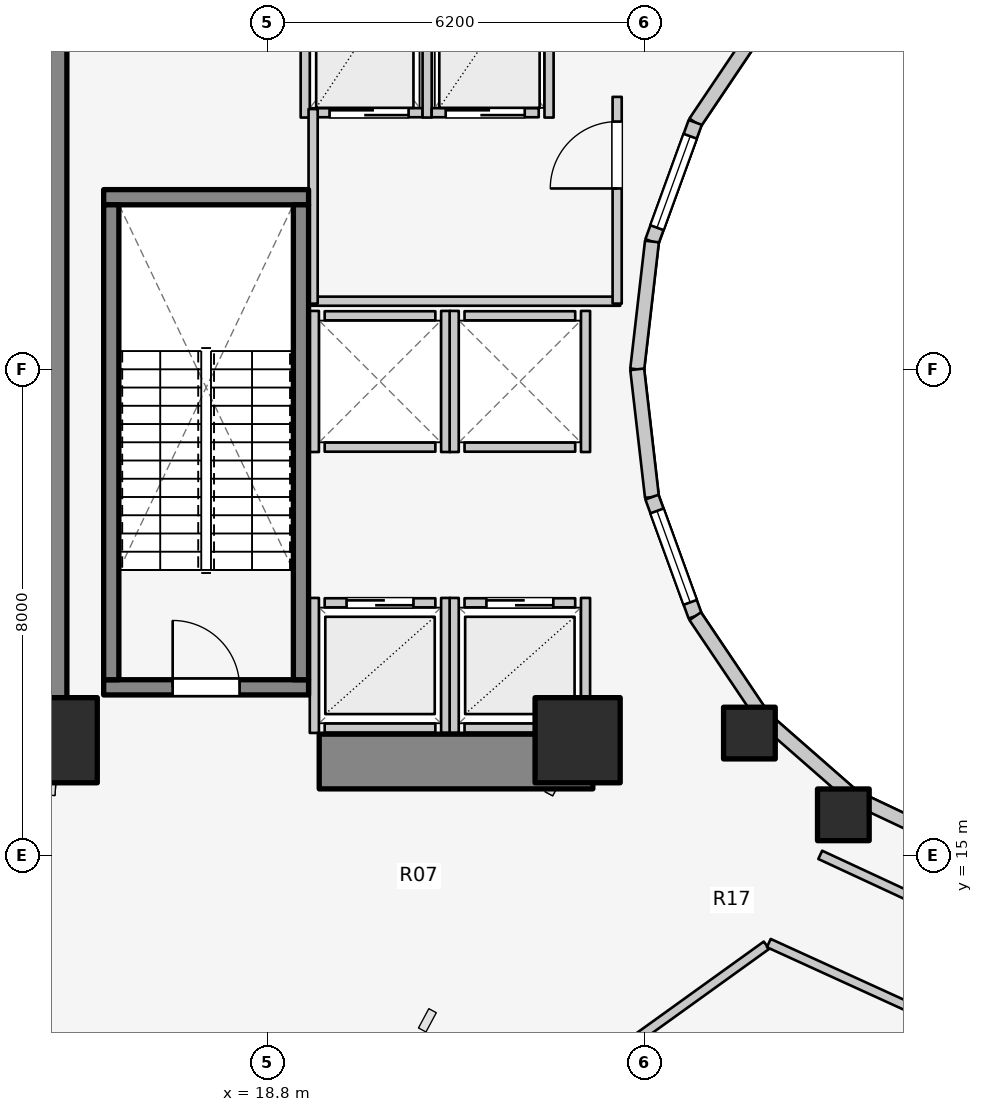
"""IFC4 building model, lengths in metres.
Left out: names, types, materials, properties, quantities, classifications, styles, units other than length and angle.
Written with IfcOpenShell. Run it as: python <this file> out.ifc"""

import sys

from ifc_helpers import new_model, si_unit, direction, frame, frame_2d, origin, origin_2d, place, context, subcontext, project, spatial, rectangle, extrude, element, fill, save


model = new_model("IFC4")
c1 = context("Model", 3, precision=1e-05, world=origin(), true_north=direction((0.0, 1.0)))
c2 = subcontext(c1, "Body", "Model", "MODEL_VIEW")
j1 = project(units=[si_unit("LENGTHUNIT", "METRE"), si_unit("PLANEANGLEUNIT", "RADIAN")], contexts=[c1])
p1 = place(None, origin())
s1 = spatial("IfcSite", under=j1, at=p1, CompositionType="ELEMENT")
p2 = place(p1, origin())
s2 = spatial("IfcBuilding", under=s1, at=p2, CompositionType="ELEMENT")
p3 = place(p2, frame((0.0, 0.0, 64.8)))
s3 = spatial("IfcBuildingStorey", under=s2, at=p3, CompositionType="ELEMENT", Elevation=64.8)
p4 = place(p3, frame((15.05, 17.05, 0.0), z_axis=(0.0, 0.0, 1.0), x_axis=(0.0, 1.0, 0.0)))
e1 = element("IfcWall", 1, at=p4, inside=s3, PredefinedType="SHEAR", context=c2, shape_type="SweptSolid", body=[
    extrude(rectangle(XDim=12.8, YDim=0.9, at=frame_2d((6.4, 0.0))), origin(), (0.0, 0.0, 1.0), 4.2),
])
p5 = place(p3, frame((19.65, 16.55, 0.0), z_axis=(0.0, 0.0, 1.0), x_axis=(1.0, 0.0, 0.0)))
e2 = element("IfcWall", 2, at=p5, inside=s3, PredefinedType="SHEAR", context=c2, shape_type="SweptSolid", body=[
    extrude(rectangle(XDim=4.5, YDim=0.9, at=frame_2d((2.25, 0.0))), origin(), (0.0, 0.0, 1.0), 4.2),
])
p6 = place(p3, frame((16.105, 17.77, 0.0), z_axis=(0.0, 0.0, 1.0), x_axis=(1.0, 0.0, 0.0)))
e3 = element("IfcWall", 3, at=p6, inside=s3, PredefinedType="SOLIDWALL", context=c2, shape_type="SweptSolid", body=[
    extrude(rectangle(XDim=3.37, YDim=0.25, at=frame_2d((1.685, 0.0))), origin(), (0.0, 0.0, 1.0), 4.2),
])
p7 = place(p6, frame((1.135, 0.0, 0.0)))
e4 = element("IfcOpeningElement", 4, at=p7, cuts=e3, PredefinedType="OPENING", context=c2, shape_type="SweptSolid", body=[
    extrude(rectangle(XDim=1.1, YDim=2.1, at=frame_2d((0.55, 1.05))), frame((0.0, 0.135, 0.0), z_axis=(0.0, -1.0, 0.0), x_axis=(1.0, 0.0, 0.0)), (0.0, 0.0, 1.0), 0.27),
])
p8 = place(p3, frame((16.105, 25.83, 0.0), z_axis=(0.0, 0.0, 1.0), x_axis=(1.0, 0.0, 0.0)))
e5 = element("IfcWall", 5, at=p8, inside=s3, PredefinedType="SOLIDWALL", context=c2, shape_type="SweptSolid", body=[
    extrude(rectangle(XDim=3.37, YDim=0.25, at=frame_2d((1.685, 0.0))), origin(), (0.0, 0.0, 1.0), 4.2),
])
for number, where, z_axis, x_axis in (
    (6, (16.23, 17.895, 0.0), (0.0, 0.0, 1.0), (0.0, 1.0, 0.0)),
    (7, (19.35, 17.895, 0.0), (0.0, 0.0, 1.0), (0.0, 1.0, 0.0)),
):
    element("IfcWall", number, at=place(p3, frame(where, z_axis=z_axis, x_axis=x_axis)), inside=s3, PredefinedType="SOLIDWALL", context=c2, shape_type="SweptSolid", body=[
        extrude(rectangle(XDim=7.81, YDim=0.25, at=frame_2d((3.905, 0.0))), origin(), (0.0, 0.0, 1.0), 4.2),
    ])
for number, where, z_axis, x_axis in (
    (8, (15.3, 16.9, 0.0), (0.0, 0.0, 1.0), (1.0, 0.0, 0.0)),
    (9, (23.9, 16.9, 0.0), (0.0, 0.0, 1.0), (1.0, 0.0, 0.0)),
):
    element("IfcColumn", number, at=place(p3, frame(where, z_axis=z_axis, x_axis=x_axis)), inside=s3, PredefinedType="COLUMN", context=c2, shape_type="SweptSolid", body=[
        extrude(rectangle(XDim=1.4, YDim=1.4, at=origin_2d()), origin(), (0.0, 0.0, 1.0), 4.2),
    ])
for number, where, z_axis, x_axis in (
    (10, (26.725, 17.018, 0.0), (0.0, 0.0, 1.0), (1.0, 0.0, 0.0)),
    (11, (28.27, 15.673, 0.0), (0.0, 0.0, 1.0), (1.0, 0.0, 0.0)),
):
    element("IfcColumn", number, at=place(p3, frame(where, z_axis=z_axis, x_axis=x_axis)), inside=s3, PredefinedType="COLUMN", context=c2, shape_type="SweptSolid", body=[
        extrude(rectangle(XDim=0.85, YDim=0.85, at=origin_2d()), origin(), (0.0, 0.0, 1.0), 4.2),
    ])
p9 = place(p3, frame((26.965, 28.742, 0.0), z_axis=(0.0, 0.0, 1.0), x_axis=(-0.558197800898, -0.829707909492, 0.0)))
e12 = element("IfcWall", 12, at=p9, inside=s3, PredefinedType="STANDARD", context=c2, shape_type="SweptSolid", body=[
    extrude(rectangle(XDim=2.027, YDim=0.23, at=frame_2d((1.013, 0.0))), origin(), (0.0, 0.0, 1.0), 2.32),
])
p10 = place(p3, frame((25.834, 27.06, 0.0), z_axis=(0.0, 0.0, 1.0), x_axis=(-0.341423187295, -0.93990968033, 0.0)))
e13 = element("IfcWall", 13, at=p10, inside=s3, PredefinedType="STANDARD", context=c2, shape_type="SweptSolid", body=[
    extrude(rectangle(XDim=2.084, YDim=0.23, at=frame_2d((1.042, 0.0))), origin(), (0.0, 0.0, 1.0), 2.8),
])
p11 = place(p10, frame((0.242, 0.0, 0.85)))
e14 = element("IfcOpeningElement", 14, at=p11, cuts=e13, PredefinedType="OPENING", context=c2, shape_type="SweptSolid", body=[
    extrude(rectangle(XDim=1.6, YDim=1.65, at=frame_2d((0.8, 0.825))), frame((0.0, 0.125, 0.0), z_axis=(0.0, -1.0, 0.0), x_axis=(1.0, 0.0, 0.0)), (0.0, 0.0, 1.0), 0.25),
])
for number, where, z_axis, x_axis in (
    (15, (25.123, 25.102, 0.0), (0.0, 0.0, 1.0), (-0.115, -0.993, 0.0)),
    (16, (24.88, 23.0, 0.0), (0.0, 0.0, 1.0), (0.115, -0.993, 0.0)),
):
    element("IfcWall", number, at=place(p3, frame(where, z_axis=z_axis, x_axis=x_axis)), inside=s3, PredefinedType="STANDARD", context=c2, shape_type="SweptSolid", body=[
        extrude(rectangle(XDim=2.115, YDim=0.23, at=frame_2d((1.058, 0.0))), origin(), (0.0, 0.0, 1.0), 2.8),
    ])
p12 = place(p3, frame((25.123, 20.898, 0.0), z_axis=(0.0, 0.0, 1.0), x_axis=(0.341423187295, -0.93990968033, 0.0)))
e17 = element("IfcWall", 17, at=p12, inside=s3, PredefinedType="STANDARD", context=c2, shape_type="SweptSolid", body=[
    extrude(rectangle(XDim=2.084, YDim=0.23, at=frame_2d((1.042, 0.0))), origin(), (0.0, 0.0, 1.0), 2.8),
])
p13 = place(p12, frame((0.242, 0.0, 0.85)))
e18 = element("IfcOpeningElement", 18, at=p13, cuts=e17, PredefinedType="OPENING", context=c2, shape_type="SweptSolid", body=[
    extrude(rectangle(XDim=1.6, YDim=1.65, at=frame_2d((0.8, 0.825))), frame((0.0, 0.125, 0.0), z_axis=(0.0, -1.0, 0.0), x_axis=(1.0, 0.0, 0.0)), (0.0, 0.0, 1.0), 0.25),
])
p14 = place(p3, frame((25.834, 18.94, 0.0), z_axis=(0.0, 0.0, 1.0), x_axis=(0.558197800898, -0.829707909492, 0.0)))
e19 = element("IfcWall", 19, at=p14, inside=s3, PredefinedType="STANDARD", context=c2, shape_type="SweptSolid", body=[
    extrude(rectangle(XDim=2.027, YDim=0.23, at=frame_2d((1.013, 0.0))), origin(), (0.0, 0.0, 1.0), 2.32),
])
p15 = place(p3, frame((26.965, 17.258, 0.0), z_axis=(0.0, 0.0, 1.0), x_axis=(0.752576694707, -0.658504607869, 0.0)))
e20 = element("IfcWall", 20, at=p15, inside=s3, PredefinedType="STANDARD", context=c2, shape_type="SweptSolid", body=[
    extrude(rectangle(XDim=1.959, YDim=0.23, at=frame_2d((0.98, 0.0))), origin(), (0.0, 0.0, 1.0), 2.32),
])
p16 = place(p3, frame((28.44, 15.968, 0.0), z_axis=(0.0, 0.0, 1.0), x_axis=(0.904179699603, -0.427152280606, 0.0)))
e21 = element("IfcWall", 21, at=p16, inside=s3, PredefinedType="STANDARD", context=c2, shape_type="SweptSolid", body=[
    extrude(rectangle(XDim=1.899, YDim=0.23, at=frame_2d((0.95, 0.0))), origin(), (0.0, 0.0, 1.0), 2.32),
])
p17 = place(p3, frame((19.74, 19.16, 0.0), z_axis=(0.0, 0.0, 1.0), x_axis=(1.0, 0.0, 0.0)))
e22 = element("IfcWall", 22, at=p17, inside=s3, PredefinedType="SOLIDWALL", context=c2, shape_type="SweptSolid", body=[
    extrude(rectangle(XDim=1.82, YDim=0.15, at=frame_2d((0.91, 0.0))), origin(), (0.0, 0.0, 1.0), 3.675),
])
p18 = place(p17, frame((0.36, 0.0, 0.0)))
e23 = element("IfcOpeningElement", 23, at=p18, cuts=e22, PredefinedType="OPENING", context=c2, shape_type="SweptSolid", body=[
    extrude(rectangle(XDim=1.1, YDim=2.1, at=frame_2d((0.55, 1.05))), frame((0.0, 0.085, 0.0), z_axis=(0.0, -1.0, 0.0), x_axis=(1.0, 0.0, 0.0)), (0.0, 0.0, 1.0), 0.17),
])
p19 = place(p3, frame((19.74, 17.1, 0.0), z_axis=(0.0, 0.0, 1.0), x_axis=(1.0, 0.0, 0.0)))
e24 = element("IfcWall", 24, at=p19, inside=s3, PredefinedType="SOLIDWALL", context=c2, shape_type="SweptSolid", body=[
    extrude(rectangle(XDim=1.82, YDim=0.15, at=frame_2d((0.91, 0.0))), origin(), (0.0, 0.0, 1.0), 3.675),
])
p20 = place(p3, frame((19.57, 17.02, 0.0), z_axis=(0.0, 0.0, 1.0), x_axis=(0.0, 1.0, 0.0)))
e25 = element("IfcWall", 25, at=p20, inside=s3, PredefinedType="SOLIDWALL", context=c2, shape_type="SweptSolid", body=[
    extrude(rectangle(XDim=2.22, YDim=0.15, at=frame_2d((1.11, 0.0))), origin(), (0.0, 0.0, 1.0), 3.22),
])
p21 = place(p3, frame((21.73, 17.02, 0.0), z_axis=(0.0, 0.0, 1.0), x_axis=(0.0, 1.0, 0.0)))
e26 = element("IfcWall", 26, at=p21, inside=s3, PredefinedType="SOLIDWALL", context=c2, shape_type="SweptSolid", body=[
    extrude(rectangle(XDim=2.22, YDim=0.15, at=frame_2d((1.11, 0.0))), origin(), (0.0, 0.0, 1.0), 3.675),
])
p22 = place(p3, frame((22.04, 19.16, 0.0), z_axis=(0.0, 0.0, 1.0), x_axis=(1.0, 0.0, 0.0)))
e27 = element("IfcWall", 27, at=p22, inside=s3, PredefinedType="SOLIDWALL", context=c2, shape_type="SweptSolid", body=[
    extrude(rectangle(XDim=1.82, YDim=0.15, at=frame_2d((0.91, 0.0))), origin(), (0.0, 0.0, 1.0), 3.22),
])
p23 = place(p22, frame((0.36, 0.0, 0.0)))
e28 = element("IfcOpeningElement", 28, at=p23, cuts=e27, PredefinedType="OPENING", context=c2, shape_type="SweptSolid", body=[
    extrude(rectangle(XDim=1.1, YDim=2.1, at=frame_2d((0.55, 1.05))), frame((0.0, 0.085, 0.0), z_axis=(0.0, -1.0, 0.0), x_axis=(1.0, 0.0, 0.0)), (0.0, 0.0, 1.0), 0.17),
])
p24 = place(p3, frame((22.04, 17.1, 0.0), z_axis=(0.0, 0.0, 1.0), x_axis=(1.0, 0.0, 0.0)))
e29 = element("IfcWall", 29, at=p24, inside=s3, PredefinedType="SOLIDWALL", context=c2, shape_type="SweptSolid", body=[
    extrude(rectangle(XDim=1.82, YDim=0.15, at=frame_2d((0.91, 0.0))), origin(), (0.0, 0.0, 1.0), 3.22),
])
p25 = place(p3, frame((21.87, 17.02, 0.0), z_axis=(0.0, 0.0, 1.0), x_axis=(0.0, 1.0, 0.0)))
e30 = element("IfcWall", 30, at=p25, inside=s3, PredefinedType="SOLIDWALL", context=c2, shape_type="SweptSolid", body=[
    extrude(rectangle(XDim=2.22, YDim=0.15, at=frame_2d((1.11, 0.0))), origin(), (0.0, 0.0, 1.0), 3.675),
])
p26 = place(p3, frame((24.03, 17.02, 0.0), z_axis=(0.0, 0.0, 1.0), x_axis=(0.0, 1.0, 0.0)))
e31 = element("IfcWall", 31, at=p26, inside=s3, PredefinedType="SOLIDWALL", context=c2, shape_type="SweptSolid", body=[
    extrude(rectangle(XDim=2.22, YDim=0.15, at=frame_2d((1.11, 0.0))), origin(), (0.0, 0.0, 1.0), 2.973),
])
for number, where, z_axis, x_axis in (
    (32, (19.74, 21.72, 0.0), (0.0, 0.0, 1.0), (1.0, 0.0, 0.0)),
    (33, (19.74, 23.88, 0.0), (0.0, 0.0, 1.0), (1.0, 0.0, 0.0)),
):
    element("IfcWall", number, at=place(p3, frame(where, z_axis=z_axis, x_axis=x_axis)), inside=s3, PredefinedType="SOLIDWALL", context=c2, shape_type="SweptSolid", body=[
        extrude(rectangle(XDim=1.82, YDim=0.15, at=frame_2d((0.91, 0.0))), origin(), (0.0, 0.0, 1.0), 3.675),
    ])
for number, where, z_axis, x_axis in (
    (34, (19.57, 21.64, 0.0), (0.0, 0.0, 1.0), (0.0, 1.0, 0.0)),
    (35, (21.73, 21.64, 0.0), (0.0, 0.0, 1.0), (0.0, 1.0, 0.0)),
):
    element("IfcWall", number, at=place(p3, frame(where, z_axis=z_axis, x_axis=x_axis)), inside=s3, PredefinedType="SOLIDWALL", context=c2, shape_type="SweptSolid", body=[
        extrude(rectangle(XDim=2.32, YDim=0.15, at=frame_2d((1.16, 0.0))), origin(), (0.0, 0.0, 1.0), 3.675),
    ])
for number, where, z_axis, x_axis in (
    (36, (22.04, 21.72, 0.0), (0.0, 0.0, 1.0), (1.0, 0.0, 0.0)),
    (37, (22.04, 23.88, 0.0), (0.0, 0.0, 1.0), (1.0, 0.0, 0.0)),
):
    element("IfcWall", number, at=place(p3, frame(where, z_axis=z_axis, x_axis=x_axis)), inside=s3, PredefinedType="SOLIDWALL", context=c2, shape_type="SweptSolid", body=[
        extrude(rectangle(XDim=1.82, YDim=0.15, at=frame_2d((0.91, 0.0))), origin(), (0.0, 0.0, 1.0), 3.22),
    ])
p27 = place(p3, frame((21.87, 21.64, 0.0), z_axis=(0.0, 0.0, 1.0), x_axis=(0.0, 1.0, 0.0)))
e38 = element("IfcWall", 38, at=p27, inside=s3, PredefinedType="SOLIDWALL", context=c2, shape_type="SweptSolid", body=[
    extrude(rectangle(XDim=2.32, YDim=0.15, at=frame_2d((1.16, 0.0))), origin(), (0.0, 0.0, 1.0), 3.675),
])
p28 = place(p3, frame((24.03, 21.64, 0.0), z_axis=(0.0, 0.0, 1.0), x_axis=(0.0, 1.0, 0.0)))
e39 = element("IfcWall", 39, at=p28, inside=s3, PredefinedType="SOLIDWALL", context=c2, shape_type="SweptSolid", body=[
    extrude(rectangle(XDim=2.32, YDim=0.15, at=frame_2d((1.16, 0.0))), origin(), (0.0, 0.0, 1.0), 3.22),
])
p29 = place(p3, frame((19.59, 27.22, 0.0), z_axis=(0.0, 0.0, 1.0), x_axis=(1.0, 0.0, 0.0)))
e40 = element("IfcWall", 40, at=p29, inside=s3, PredefinedType="SOLIDWALL", context=c2, shape_type="SweptSolid", body=[
    extrude(rectangle(XDim=1.76, YDim=0.15, at=frame_2d((0.88, 0.0))), origin(), (0.0, 0.0, 1.0), 3.675),
])
p30 = place(p29, frame((0.23, 0.0, 0.0)))
e41 = element("IfcOpeningElement", 41, at=p30, cuts=e40, PredefinedType="OPENING", context=c2, shape_type="SweptSolid", body=[
    extrude(rectangle(XDim=1.3, YDim=2.1, at=frame_2d((0.65, 1.05))), frame((0.0, 0.085, 0.0), z_axis=(0.0, -1.0, 0.0), x_axis=(1.0, 0.0, 0.0)), (0.0, 0.0, 1.0), 0.17),
])
for number, where, z_axis, x_axis in (
    (42, (19.42, 27.14, 0.0), (0.0, 0.0, 1.0), (0.0, 1.0, 0.0)),
    (43, (21.425, 27.14, 0.0), (0.0, 0.0, 1.0), (0.0, 1.0, 0.0)),
):
    element("IfcWall", number, at=place(p3, frame(where, z_axis=z_axis, x_axis=x_axis)), inside=s3, PredefinedType="SOLIDWALL", context=c2, shape_type="SweptSolid", body=[
        extrude(rectangle(XDim=2.72, YDim=0.15, at=frame_2d((1.36, 0.0))), origin(), (0.0, 0.0, 1.0), 3.675),
    ])
p31 = place(p3, frame((21.5, 27.22, 0.0), z_axis=(0.0, 0.0, 1.0), x_axis=(1.0, 0.0, 0.0)))
e44 = element("IfcWall", 44, at=p31, inside=s3, PredefinedType="SOLIDWALL", context=c2, shape_type="SweptSolid", body=[
    extrude(rectangle(XDim=1.76, YDim=0.15, at=frame_2d((0.88, 0.0))), origin(), (0.0, 0.0, 1.0), 3.675),
])
p32 = place(p31, frame((0.23, 0.0, 0.0)))
e45 = element("IfcOpeningElement", 45, at=p32, cuts=e44, PredefinedType="OPENING", context=c2, shape_type="SweptSolid", body=[
    extrude(rectangle(XDim=1.3, YDim=2.1, at=frame_2d((0.65, 1.05))), frame((0.0, 0.085, 0.0), z_axis=(0.0, -1.0, 0.0), x_axis=(1.0, 0.0, 0.0)), (0.0, 0.0, 1.0), 0.17),
])
p33 = place(p3, frame((23.43, 27.14, 0.0), z_axis=(0.0, 0.0, 1.0), x_axis=(0.0, 1.0, 0.0)))
e46 = element("IfcWall", 46, at=p33, inside=s3, PredefinedType="SOLIDWALL", context=c2, shape_type="SweptSolid", body=[
    extrude(rectangle(XDim=2.72, YDim=0.15, at=frame_2d((1.36, 0.0))), origin(), (0.0, 0.0, 1.0), 3.675),
])
p34 = place(p3, frame((19.52, 24.12, 0.0), z_axis=(0.0, 0.0, 1.0), x_axis=(1.0, 0.0, 0.0)))
e47 = element("IfcWall", 47, at=p34, inside=s3, PredefinedType="PARTITIONING", context=c2, shape_type="SweptSolid", body=[
    extrude(rectangle(XDim=5.08, YDim=0.15, at=frame_2d((2.54, 0.0))), origin(), (0.0, 0.0, 1.0), 3.22),
])
p35 = place(p3, frame((19.55, 24.08, 0.0), z_axis=(0.0, 0.0, 1.0), x_axis=(0.0, 1.0, 0.0)))
e48 = element("IfcWall", 48, at=p35, inside=s3, PredefinedType="PARTITIONING", context=c2, shape_type="SweptSolid", body=[
    extrude(rectangle(XDim=3.2, YDim=0.15, at=frame_2d((1.6, 0.0))), origin(), (0.0, 0.0, 1.0), 3.675),
])
p36 = place(p3, frame((24.55, 24.08, 0.0), z_axis=(0.0, 0.0, 1.0), x_axis=(0.0, 1.0, 0.0)))
e49 = element("IfcWall", 49, at=p36, inside=s3, PredefinedType="PARTITIONING", context=c2, shape_type="SweptSolid", body=[
    extrude(rectangle(XDim=3.4, YDim=0.15, at=frame_2d((1.7, 0.0))), origin(), (0.0, 0.0, 1.0), 3.675),
])
p37 = place(p36, frame((1.894, 0.0, 0.0)))
e50 = element("IfcOpeningElement", 50, at=p37, cuts=e49, PredefinedType="OPENING", context=c2, shape_type="SweptSolid", body=[
    extrude(rectangle(XDim=1.1, YDim=2.1, at=frame_2d((0.55, 1.05))), frame((0.0, 0.085, 0.0), z_axis=(0.0, -1.0, 0.0), x_axis=(1.0, 0.0, 0.0)), (0.0, 0.0, 1.0), 0.17),
])
p38 = place(p3, frame((27.89, 15.015, 0.0), z_axis=(0.0, 0.0, 1.0), x_axis=(0.906943449489, -0.421252393975, 0.0)))
e51 = element("IfcWall", 51, at=p38, inside=s3, PredefinedType="PARTITIONING", context=c2, shape_type="SweptSolid", body=[
    extrude(rectangle(XDim=2.186, YDim=0.15, at=frame_2d((1.093, 0.0))), origin(), (0.0, 0.0, 1.0), 2.32),
])
p39 = place(p3, frame((27.005, 13.528, 0.0), z_axis=(0.0, 0.0, 1.0), x_axis=(-0.811691742112, -0.584086051697, 0.0)))
e52 = element("IfcWall", 52, at=p39, inside=s3, PredefinedType="PARTITIONING", context=c2, shape_type="SweptSolid", body=[
    extrude(rectangle(XDim=9.824, YDim=0.15, at=frame_2d((4.912, 0.0))), origin(), (0.0, 0.0, 1.0), 2.32),
])
p40 = place(p3, frame((27.044, 13.564, 0.0), z_axis=(0.0, 0.0, 1.0), x_axis=(0.909736731002, -0.415185597373, 0.0)))
e53 = element("IfcWall", 53, at=p40, inside=s3, PredefinedType="PARTITIONING", context=c2, shape_type="SweptSolid", body=[
    extrude(rectangle(XDim=2.633, YDim=0.15, at=frame_2d((1.317, 0.0))), origin(), (0.0, 0.0, 1.0), 3.092),
])
p41 = place(p11, origin())
e54 = element("IfcWindow", 54, at=p41, inside=s3, PartitioningType="SINGLE_PANEL", PredefinedType="WINDOW", context=c2, shape_type="SweptSolid", body=[
    extrude(rectangle(XDim=1.6, YDim=1.65, at=frame_2d((0.8, 0.825))), frame((0.0, 0.03, 0.0), z_axis=(0.0, -1.0, 0.0), x_axis=(1.0, 0.0, 0.0)), (0.0, 0.0, 1.0), 0.06),
])
fill(e14, e54)
p42 = place(p13, origin())
e55 = element("IfcWindow", 55, at=p42, inside=s3, PartitioningType="SINGLE_PANEL", PredefinedType="WINDOW", context=c2, shape_type="SweptSolid", body=[
    extrude(rectangle(XDim=1.6, YDim=1.65, at=frame_2d((0.8, 0.825))), frame((0.0, 0.03, 0.0), z_axis=(0.0, -1.0, 0.0), x_axis=(1.0, 0.0, 0.0)), (0.0, 0.0, 1.0), 0.06),
])
fill(e18, e55)
p43 = place(p7, origin())
e56 = element("IfcDoor", 56, at=p43, inside=s3, OperationType="SINGLE_SWING_LEFT", PredefinedType="DOOR", context=c2, shape_type="SweptSolid", body=[
    extrude(rectangle(XDim=1.1, YDim=2.1, at=frame_2d((0.55, 1.05))), frame((0.0, 0.025, 0.0), z_axis=(0.0, -1.0, 0.0), x_axis=(1.0, 0.0, 0.0)), (0.0, 0.0, 1.0), 0.05),
])
fill(e4, e56)
p44 = place(p18, origin())
e57 = element("IfcDoor", 57, at=p44, inside=s3, OperationType="DOUBLE_DOOR_SLIDING", PredefinedType="DOOR", context=c2, shape_type="SweptSolid", body=[
    extrude(rectangle(XDim=1.1, YDim=2.1, at=frame_2d((0.55, 1.05))), frame((0.0, 0.025, 0.0), z_axis=(0.0, -1.0, 0.0), x_axis=(1.0, 0.0, 0.0)), (0.0, 0.0, 1.0), 0.05),
])
fill(e23, e57)
p45 = place(p23, origin())
e58 = element("IfcDoor", 58, at=p45, inside=s3, OperationType="DOUBLE_DOOR_SLIDING", PredefinedType="DOOR", context=c2, shape_type="SweptSolid", body=[
    extrude(rectangle(XDim=1.1, YDim=2.1, at=frame_2d((0.55, 1.05))), frame((0.0, 0.025, 0.0), z_axis=(0.0, -1.0, 0.0), x_axis=(1.0, 0.0, 0.0)), (0.0, 0.0, 1.0), 0.05),
])
fill(e28, e58)
p46 = place(p30, origin())
e59 = element("IfcDoor", 59, at=p46, inside=s3, OperationType="DOUBLE_DOOR_SLIDING", PredefinedType="DOOR", context=c2, shape_type="SweptSolid", body=[
    extrude(rectangle(XDim=1.3, YDim=2.1, at=frame_2d((0.65, 1.05))), frame((0.0, 0.025, 0.0), z_axis=(0.0, -1.0, 0.0), x_axis=(1.0, 0.0, 0.0)), (0.0, 0.0, 1.0), 0.05),
])
fill(e41, e59)
p47 = place(p32, origin())
e60 = element("IfcDoor", 60, at=p47, inside=s3, OperationType="DOUBLE_DOOR_SLIDING", PredefinedType="DOOR", context=c2, shape_type="SweptSolid", body=[
    extrude(rectangle(XDim=1.3, YDim=2.1, at=frame_2d((0.65, 1.05))), frame((0.0, 0.025, 0.0), z_axis=(0.0, -1.0, 0.0), x_axis=(1.0, 0.0, 0.0)), (0.0, 0.0, 1.0), 0.05),
])
fill(e45, e60)
p48 = place(p37, origin())
e61 = element("IfcDoor", 61, at=p48, inside=s3, OperationType="SINGLE_SWING_LEFT", PredefinedType="DOOR", context=c2, shape_type="SweptSolid", body=[
    extrude(rectangle(XDim=1.1, YDim=2.1, at=frame_2d((0.55, 1.05))), frame((0.0, 0.025, 0.0), z_axis=(0.0, -1.0, 0.0), x_axis=(1.0, 0.0, 0.0)), (0.0, 0.0, 1.0), 0.05),
])
fill(e50, e61)
save(model, sys.argv[1])
